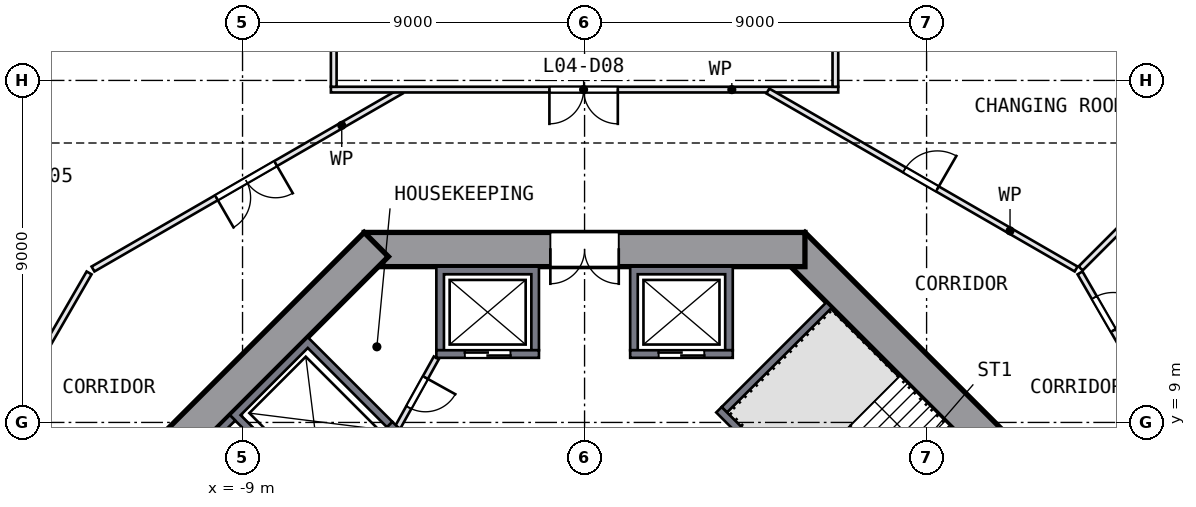
"""IFC4 building model, lengths in metres.
Left out: names, types, materials, properties, quantities, classifications, styles, units other than length and angle.
Written with IfcOpenShell. Run it as: python <this file> out.ifc"""

import sys

from ifc_helpers import new_model, si_unit, direction, frame, frame_2d, origin, place, context, subcontext, project, spatial, polyline, rectangle, outline, extrude, element, fill, save


model = new_model("IFC4")
c1 = context("Model", 3, precision=1e-05, world=origin(), true_north=direction((0.0, 1.0)))
c2 = subcontext(c1, "Body", "Model", "MODEL_VIEW")
j1 = project(units=[si_unit("LENGTHUNIT", "METRE"), si_unit("PLANEANGLEUNIT", "RADIAN")], contexts=[c1])
p1 = place(None, origin())
s1 = spatial("IfcSite", under=j1, at=p1, CompositionType="ELEMENT")
p2 = place(p1, origin())
s2 = spatial("IfcBuilding", under=s1, at=p2, CompositionType="ELEMENT")
p3 = place(p2, frame((0.0, 0.0, 23.5)))
s3 = spatial("IfcBuildingStorey", under=s2, at=p3, CompositionType="ELEMENT", Elevation=23.5)
p4 = place(p3, frame((13.682, 5.481, 0.0), z_axis=(0.0, 0.0, 1.0), x_axis=(-0.707106781, 0.707106781, 0.0)))
e1 = element("IfcWall", 1, at=p4, inside=s3, PredefinedType="SHEAR", context=c2, shape_type="SweptSolid", body=[
    extrude(rectangle(XDim=11.598, YDim=0.9, at=frame_2d((5.799, 0.0))), origin(), (0.0, 0.0, 1.0), 4.5),
])
p5 = place(p4, frame((2.099, 0.0, 0.0)))
e2 = element("IfcOpeningElement", 2, at=p5, cuts=e1, PredefinedType="OPENING", context=c2, shape_type="SweptSolid", body=[
    extrude(rectangle(XDim=1.2, YDim=2.1, at=frame_2d((0.6, 1.05))), frame((0.0, 0.46, 0.0), z_axis=(0.0, -1.0, 0.0), x_axis=(1.0, 0.0, 0.0)), (0.0, 0.0, 1.0), 0.92),
])
p6 = place(p3, frame((5.799, 13.55, 0.0), z_axis=(0.0, 0.0, 1.0), x_axis=(-1.0, 0.0, 0.0)))
e3 = element("IfcWall", 3, at=p6, inside=s3, PredefinedType="SHEAR", context=c2, shape_type="SweptSolid", body=[
    extrude(rectangle(XDim=11.598, YDim=0.9, at=frame_2d((5.799, 0.0))), origin(), (0.0, 0.0, 1.0), 4.5),
])
p7 = place(p6, frame((4.899, 0.0, 0.0)))
e4 = element("IfcOpeningElement", 4, at=p7, cuts=e3, PredefinedType="OPENING", context=c2, shape_type="SweptSolid", body=[
    extrude(rectangle(XDim=1.8, YDim=2.1, at=frame_2d((0.9, 1.05))), frame((0.0, 0.46, 0.0), z_axis=(0.0, -1.0, 0.0), x_axis=(1.0, 0.0, 0.0)), (0.0, 0.0, 1.0), 0.92),
])
p8 = place(p3, frame((-5.481, 13.682, 0.0), z_axis=(0.0, 0.0, 1.0), x_axis=(-0.707106781, -0.707106781, 0.0)))
e5 = element("IfcWall", 5, at=p8, inside=s3, PredefinedType="SHEAR", context=c2, shape_type="SweptSolid", body=[
    extrude(rectangle(XDim=11.598, YDim=0.9, at=frame_2d((5.799, 0.0))), origin(), (0.0, 0.0, 1.0), 4.5),
])
p9 = place(p3, frame((-6.36, 24.258, 0.0), z_axis=(0.0, 0.0, 1.0), x_axis=(-0.866029009, -0.499993756, 0.0)))
e6 = element("IfcWall", 6, at=p9, inside=s3, PredefinedType="SOLIDWALL", context=c2, shape_type="SweptSolid", body=[
    extrude(rectangle(XDim=13.242, YDim=0.14, at=frame_2d((6.621, 0.0))), origin(), (0.0, 0.0, 1.0), 4.0),
])
p10 = place(p9, frame((1.46, 0.0, 0.9)))
e7 = element("IfcOpeningElement", 7, at=p10, cuts=e6, PredefinedType="OPENING", context=c2, shape_type="SweptSolid", body=[
    extrude(rectangle(XDim=3.6, YDim=2.4, at=frame_2d((1.8, 1.2))), frame((0.0, 0.08, 0.0), z_axis=(0.0, -1.0, 0.0), x_axis=(1.0, 0.0, 0.0)), (0.0, 0.0, 1.0), 0.16),
])
p11 = place(p9, frame((8.215, 0.0, 0.9)))
e8 = element("IfcOpeningElement", 8, at=p11, cuts=e6, PredefinedType="OPENING", context=c2, shape_type="SweptSolid", body=[
    extrude(rectangle(XDim=3.0, YDim=2.4, at=frame_2d((1.5, 1.2))), frame((0.0, 0.08, 0.0), z_axis=(0.0, -1.0, 0.0), x_axis=(1.0, 0.0, 0.0)), (0.0, 0.0, 1.0), 0.16),
])
p12 = place(p3, frame((17.586, 17.777, 0.0), z_axis=(0.0, 0.0, 1.0), x_axis=(-0.866023287, 0.500003667, 0.0)))
e9 = element("IfcWall", 9, at=p12, inside=s3, PredefinedType="SOLIDWALL", context=c2, shape_type="SweptSolid", body=[
    extrude(rectangle(XDim=12.801, YDim=0.14, at=frame_2d((6.4, 0.0))), origin(), (0.0, 0.0, 1.0), 4.0),
])
p13 = place(p12, frame((1.748, 0.0, 0.9)))
e10 = element("IfcOpeningElement", 10, at=p13, cuts=e9, PredefinedType="OPENING", context=c2, shape_type="SweptSolid", body=[
    extrude(rectangle(XDim=3.0, YDim=2.4, at=frame_2d((1.5, 1.2))), frame((0.0, 0.08, 0.0), z_axis=(0.0, -1.0, 0.0), x_axis=(1.0, 0.0, 0.0)), (0.0, 0.0, 1.0), 0.16),
])
p14 = place(p12, frame((7.902, 0.0, 0.9)))
e11 = element("IfcOpeningElement", 11, at=p14, cuts=e9, PredefinedType="OPENING", context=c2, shape_type="SweptSolid", body=[
    extrude(rectangle(XDim=3.6, YDim=2.4, at=frame_2d((1.8, 1.2))), frame((0.0, 0.08, 0.0), z_axis=(0.0, -1.0, 0.0), x_axis=(1.0, 0.0, 0.0)), (0.0, 0.0, 1.0), 0.16),
])
p15 = place(p3, origin())
e12 = element("IfcWall", 12, at=p15, inside=s3, PredefinedType="SOLIDWALL", context=c2, shape_type="SweptSolid", body=[
    extrude(outline(polyline([(3.9, 13.1), (3.9, 10.9), (3.7, 10.9), (3.7, 12.9), (1.4, 12.9), (1.4, 10.9), (1.2, 10.9), (1.2, 13.1), (3.9, 13.1)])), origin(), (0.0, 0.0, 1.0), 4.0),
])
p16 = place(p3, frame((1.2, 10.8, 0.0), z_axis=(0.0, 0.0, 1.0), x_axis=(1.0, 0.0, 0.0)))
e13 = element("IfcWall", 13, at=p16, inside=s3, PredefinedType="SOLIDWALL", context=c2, shape_type="SweptSolid", body=[
    extrude(rectangle(XDim=2.7, YDim=0.2, at=frame_2d((1.35, 0.0))), origin(), (0.0, 0.0, 1.0), 4.0),
])
p17 = place(p16, frame((0.75, 0.0, 0.0)))
e14 = element("IfcOpeningElement", 14, at=p17, cuts=e13, PredefinedType="OPENING", context=c2, shape_type="SweptSolid", body=[
    extrude(rectangle(XDim=1.2, YDim=2.1, at=frame_2d((0.6, 1.05))), frame((0.0, 0.11, 0.0), z_axis=(0.0, -1.0, 0.0), x_axis=(1.0, 0.0, 0.0)), (0.0, 0.0, 1.0), 0.22),
])
p18 = place(p3, origin())
e15 = element("IfcWall", 15, at=p18, inside=s3, PredefinedType="SOLIDWALL", context=c2, shape_type="SweptSolid", body=[
    extrude(outline(polyline([(-3.9, 10.9), (-3.9, 13.1), (-1.2, 13.1), (-1.2, 10.9), (-1.4, 10.9), (-1.4, 12.9), (-3.7, 12.9), (-3.7, 10.9), (-3.9, 10.9)])), origin(), (0.0, 0.0, 1.0), 4.0),
])
p19 = place(p3, frame((-1.2, 10.8, 0.0), z_axis=(0.0, 0.0, 1.0), x_axis=(-1.0, 0.0, 0.0)))
e16 = element("IfcWall", 16, at=p19, inside=s3, PredefinedType="SOLIDWALL", context=c2, shape_type="SweptSolid", body=[
    extrude(rectangle(XDim=2.7, YDim=0.2, at=frame_2d((1.35, 0.0))), origin(), (0.0, 0.0, 1.0), 4.0),
])
p20 = place(p19, frame((0.75, 0.0, 0.0)))
e17 = element("IfcOpeningElement", 17, at=p20, cuts=e16, PredefinedType="OPENING", context=c2, shape_type="SweptSolid", body=[
    extrude(rectangle(XDim=1.2, YDim=2.1, at=frame_2d((0.6, 1.05))), frame((0.0, 0.11, 0.0), z_axis=(0.0, -1.0, 0.0), x_axis=(1.0, 0.0, 0.0)), (0.0, 0.0, 1.0), 0.22),
])
p21 = place(p3, origin())
e18 = element("IfcWall", 18, at=p21, inside=s3, PredefinedType="SOLIDWALL", context=c2, shape_type="SweptSolid", body=[
    extrude(outline(polyline([(-9.334, 9.192), (-7.283, 11.243), (-5.056, 9.016), (-5.197, 8.874), (-7.283, 10.96), (-9.051, 9.192), (-6.965, 7.106), (-7.106, 6.965), (-9.334, 9.192)])), origin(), (0.0, 0.0, 1.0), 4.0),
])
p22 = place(p3, frame((-4.985, 8.945, 0.0), z_axis=(0.0, 0.0, 1.0), x_axis=(-0.707106781, -0.707106781, 0.0)))
e19 = element("IfcWall", 19, at=p22, inside=s3, PredefinedType="SOLIDWALL", context=c2, shape_type="SweptSolid", body=[
    extrude(rectangle(XDim=2.9, YDim=0.2, at=frame_2d((1.45, 0.0))), origin(), (0.0, 0.0, 1.0), 4.0),
])
p23 = place(p22, frame((0.85, 0.0, 0.0)))
e20 = element("IfcOpeningElement", 20, at=p23, cuts=e19, PredefinedType="OPENING", context=c2, shape_type="SweptSolid", body=[
    extrude(rectangle(XDim=1.2, YDim=2.1, at=frame_2d((0.6, 1.05))), frame((0.0, 0.11, 0.0), z_axis=(0.0, -1.0, 0.0), x_axis=(1.0, 0.0, 0.0)), (0.0, 0.0, 1.0), 0.22),
])
p24 = place(p3, origin())
e21 = element("IfcWall", 21, at=p24, inside=s3, PredefinedType="SOLIDWALL", context=c2, shape_type="SweptSolid", body=[
    extrude(outline(polyline([(-11.243, 7.283), (-9.334, 9.192), (-9.192, 9.051), (-10.96, 7.283), (-8.874, 5.197), (-9.016, 5.056), (-11.243, 7.283)])), origin(), (0.0, 0.0, 1.0), 4.0),
])
p25 = place(p3, frame((3.535, 9.334, 0.0), z_axis=(0.0, 0.0, 1.0), x_axis=(0.707106781, -0.707106781, 0.0)))
e22 = element("IfcWall", 22, at=p25, inside=s3, PredefinedType="SOLIDWALL", context=c2, shape_type="SweptSolid", body=[
    extrude(rectangle(XDim=8.2, YDim=0.2, at=frame_2d((4.1, 0.0))), origin(), (0.0, 0.0, 1.0), 4.0),
])
p26 = place(p25, frame((6.6, 0.0, 0.0)))
e23 = element("IfcOpeningElement", 23, at=p26, cuts=e22, PredefinedType="OPENING", context=c2, shape_type="SweptSolid", body=[
    extrude(rectangle(XDim=1.2, YDim=2.1, at=frame_2d((0.6, 1.05))), frame((0.0, 0.11, 0.0), z_axis=(0.0, -1.0, 0.0), x_axis=(1.0, 0.0, 0.0)), (0.0, 0.0, 1.0), 0.22),
])
p27 = place(p3, frame((3.677, 9.334, 0.0), z_axis=(0.0, 0.0, 1.0), x_axis=(0.707106781, 0.707106781, 0.0)))
e24 = element("IfcWall", 24, at=p27, inside=s3, PredefinedType="SOLIDWALL", context=c2, shape_type="SweptSolid", body=[
    extrude(rectangle(XDim=3.9, YDim=0.2, at=frame_2d((1.95, 0.0))), origin(), (0.0, 0.0, 1.0), 4.0),
])
p28 = place(p3, frame((-3.9, 10.7, 0.0), z_axis=(0.0, 0.0, 1.0), x_axis=(-0.485692555, -0.874129705, 0.0)))
e25 = element("IfcWall", 25, at=p28, inside=s3, PredefinedType="PARTITIONING", context=c2, shape_type="SweptSolid", body=[
    extrude(rectangle(XDim=2.089, YDim=0.15, at=frame_2d((1.044, 0.0))), origin(), (0.0, 0.0, 1.0), 4.0),
])
p29 = place(p28, frame((0.594, 0.0, 0.0)))
e26 = element("IfcOpeningElement", 26, at=p29, cuts=e25, PredefinedType="OPENING", context=c2, shape_type="SweptSolid", body=[
    extrude(rectangle(XDim=0.9, YDim=2.1, at=frame_2d((0.45, 1.05))), frame((0.0, 0.085, 0.0), z_axis=(0.0, -1.0, 0.0), x_axis=(1.0, 0.0, 0.0)), (0.0, 0.0, 1.0), 0.17),
])
p30 = place(p3, frame((-17.721, 4.823, 0.0), z_axis=(0.0, 0.0, 1.0), x_axis=(0.499979668, 0.866037142, 0.0)))
e27 = element("IfcWall", 27, at=p30, inside=s3, PredefinedType="PARTITIONING", context=c2, shape_type="SweptSolid", body=[
    extrude(rectangle(XDim=9.367, YDim=0.15, at=frame_2d((4.683, 0.0))), origin(), (0.0, 0.0, 1.0), 4.0),
])
p31 = place(p3, frame((-4.823, 17.721, 0.0), z_axis=(0.0, 0.0, 1.0), x_axis=(-0.866037142, -0.499979668, 0.0)))
e28 = element("IfcWall", 28, at=p31, inside=s3, PredefinedType="PARTITIONING", context=c2, shape_type="SweptSolid", body=[
    extrude(rectangle(XDim=9.367, YDim=0.15, at=frame_2d((4.683, 0.0))), origin(), (0.0, 0.0, 1.0), 4.0),
])
p32 = place(p31, frame((3.817, 0.0, 0.0)))
e29 = element("IfcOpeningElement", 29, at=p32, cuts=e28, PredefinedType="OPENING", context=c2, shape_type="SweptSolid", body=[
    extrude(rectangle(XDim=1.8, YDim=2.1, at=frame_2d((0.9, 1.05))), frame((0.0, 0.085, 0.0), z_axis=(0.0, -1.0, 0.0), x_axis=(1.0, 0.0, 0.0)), (0.0, 0.0, 1.0), 0.17),
])
p33 = place(p3, frame((6.675, 17.758, 0.0), z_axis=(0.0, 0.0, 1.0), x_axis=(-1.0, 0.0, 0.0)))
e30 = element("IfcWall", 30, at=p33, inside=s3, PredefinedType="PARTITIONING", context=c2, shape_type="SweptSolid", body=[
    extrude(rectangle(XDim=13.35, YDim=0.15, at=frame_2d((6.675, 0.0))), origin(), (0.0, 0.0, 1.0), 4.0),
])
p34 = place(p33, frame((5.8, 0.0, 0.0)))
e31 = element("IfcOpeningElement", 31, at=p34, cuts=e30, PredefinedType="OPENING", context=c2, shape_type="SweptSolid", body=[
    extrude(rectangle(XDim=1.8, YDim=2.1, at=frame_2d((0.9, 1.05))), frame((0.0, 0.085, 0.0), z_axis=(0.0, -1.0, 0.0), x_axis=(1.0, 0.0, 0.0)), (0.0, 0.0, 1.0), 0.17),
])
p35 = place(p3, frame((-6.6, 23.415, 0.0), z_axis=(0.0, 0.0, 1.0), x_axis=(0.0, -1.0, 0.0)))
e32 = element("IfcWall", 32, at=p35, inside=s3, PredefinedType="PARTITIONING", context=c2, shape_type="SweptSolid", body=[
    extrude(rectangle(XDim=5.582, YDim=0.15, at=frame_2d((2.791, 0.0))), origin(), (0.0, 0.0, 1.0), 4.0),
])
p36 = place(p3, frame((4.823, 17.721, 0.0), z_axis=(0.0, 0.0, 1.0), x_axis=(0.866037142, -0.499979668, 0.0)))
e33 = element("IfcWall", 33, at=p36, inside=s3, PredefinedType="PARTITIONING", context=c2, shape_type="SweptSolid", body=[
    extrude(rectangle(XDim=9.367, YDim=0.15, at=frame_2d((4.683, 0.0))), origin(), (0.0, 0.0, 1.0), 4.0),
])
p37 = place(p36, frame((4.15, 0.0, 0.0)))
e34 = element("IfcOpeningElement", 34, at=p37, cuts=e33, PredefinedType="OPENING", context=c2, shape_type="SweptSolid", body=[
    extrude(rectangle(XDim=1.0, YDim=2.1, at=frame_2d((0.5, 1.05))), frame((0.0, 0.085, 0.0), z_axis=(0.0, -1.0, 0.0), x_axis=(1.0, 0.0, 0.0)), (0.0, 0.0, 1.0), 0.17),
])
p38 = place(p3, frame((6.6, 17.833, 0.0), z_axis=(0.0, 0.0, 1.0), x_axis=(0.0, 1.0, 0.0)))
e35 = element("IfcWall", 35, at=p38, inside=s3, PredefinedType="PARTITIONING", context=c2, shape_type="SweptSolid", body=[
    extrude(rectangle(XDim=5.582, YDim=0.15, at=frame_2d((2.791, 0.0))), origin(), (0.0, 0.0, 1.0), 4.0),
])
p39 = place(p3, frame((13.038, 12.935, 0.0), z_axis=(0.0, 0.0, 1.0), x_axis=(0.499933044, -0.866064057, 0.0)))
e36 = element("IfcWall", 36, at=p39, inside=s3, PredefinedType="PARTITIONING", context=c2, shape_type="SweptSolid", body=[
    extrude(rectangle(XDim=2.408, YDim=0.15, at=frame_2d((1.204, 0.0))), origin(), (0.0, 0.0, 1.0), 4.0),
])
p40 = place(p39, frame((0.75, 0.0, 0.0)))
e37 = element("IfcOpeningElement", 37, at=p40, cuts=e36, PredefinedType="OPENING", context=c2, shape_type="SweptSolid", body=[
    extrude(rectangle(XDim=1.0, YDim=2.1, at=frame_2d((0.5, 1.05))), frame((0.0, 0.085, 0.0), z_axis=(0.0, -1.0, 0.0), x_axis=(1.0, 0.0, 0.0)), (0.0, 0.0, 1.0), 0.17),
])
p41 = place(p3, frame((17.7, 17.7, 0.0), z_axis=(0.0, 0.0, 1.0), x_axis=(-0.707106781, -0.707106781, 0.0)))
e38 = element("IfcWall", 38, at=p41, inside=s3, PredefinedType="PARTITIONING", context=c2, shape_type="SweptSolid", body=[
    extrude(rectangle(XDim=6.572, YDim=0.15, at=frame_2d((3.286, 0.0))), origin(), (0.0, 0.0, 1.0), 4.0),
])
p42 = place(p11, origin())
e39 = element("IfcWindow", 39, at=p42, inside=s3, PartitioningType="SINGLE_PANEL", PredefinedType="WINDOW", context=c2, shape_type="SweptSolid", body=[
    extrude(rectangle(XDim=3.0, YDim=2.4, at=frame_2d((1.5, 1.2))), frame((0.0, 0.03, 0.0), z_axis=(0.0, -1.0, 0.0), x_axis=(1.0, 0.0, 0.0)), (0.0, 0.0, 1.0), 0.06),
])
fill(e8, e39)
p43 = place(p13, origin())
e40 = element("IfcWindow", 40, at=p43, inside=s3, PartitioningType="SINGLE_PANEL", PredefinedType="WINDOW", context=c2, shape_type="SweptSolid", body=[
    extrude(rectangle(XDim=3.0, YDim=2.4, at=frame_2d((1.5, 1.2))), frame((0.0, 0.03, 0.0), z_axis=(0.0, -1.0, 0.0), x_axis=(1.0, 0.0, 0.0)), (0.0, 0.0, 1.0), 0.06),
])
fill(e10, e40)
p44 = place(p17, origin())
e41 = element("IfcDoor", 41, at=p44, inside=s3, OperationType="DOUBLE_DOOR_SLIDING", PredefinedType="DOOR", context=c2, shape_type="SweptSolid", body=[
    extrude(rectangle(XDim=1.2, YDim=2.1, at=frame_2d((0.6, 1.05))), frame((0.0, 0.025, 0.0), z_axis=(0.0, -1.0, 0.0), x_axis=(1.0, 0.0, 0.0)), (0.0, 0.0, 1.0), 0.05),
])
fill(e14, e41)
p45 = place(p20, origin())
e42 = element("IfcDoor", 42, at=p45, inside=s3, OperationType="DOUBLE_DOOR_SLIDING", PredefinedType="DOOR", context=c2, shape_type="SweptSolid", body=[
    extrude(rectangle(XDim=1.2, YDim=2.1, at=frame_2d((0.6, 1.05))), frame((0.0, 0.025, 0.0), z_axis=(0.0, -1.0, 0.0), x_axis=(1.0, 0.0, 0.0)), (0.0, 0.0, 1.0), 0.05),
])
fill(e17, e42)
p46 = place(p7, origin())
e43 = element("IfcDoor", 43, at=p46, inside=s3, OperationType="DOUBLE_DOOR_SINGLE_SWING", PredefinedType="DOOR", context=c2, shape_type="SweptSolid", body=[
    extrude(rectangle(XDim=1.8, YDim=2.1, at=frame_2d((0.9, 1.05))), frame((0.0, 0.025, 0.0), z_axis=(0.0, -1.0, 0.0), x_axis=(1.0, 0.0, 0.0)), (0.0, 0.0, 1.0), 0.05),
])
fill(e4, e43)
p47 = place(p29, origin())
e44 = element("IfcDoor", 44, at=p47, inside=s3, OperationType="SINGLE_SWING_LEFT", PredefinedType="DOOR", context=c2, shape_type="SweptSolid", body=[
    extrude(rectangle(XDim=0.9, YDim=2.1, at=frame_2d((0.45, 1.05))), frame((0.0, 0.025, 0.0), z_axis=(0.0, -1.0, 0.0), x_axis=(1.0, 0.0, 0.0)), (0.0, 0.0, 1.0), 0.05),
])
fill(e26, e44)
p48 = place(p32, origin())
e45 = element("IfcDoor", 45, at=p48, inside=s3, OperationType="DOUBLE_DOOR_SINGLE_SWING", PredefinedType="DOOR", context=c2, shape_type="SweptSolid", body=[
    extrude(rectangle(XDim=1.8, YDim=2.1, at=frame_2d((0.9, 1.05))), frame((0.0, 0.025, 0.0), z_axis=(0.0, -1.0, 0.0), x_axis=(1.0, 0.0, 0.0)), (0.0, 0.0, 1.0), 0.05),
])
fill(e29, e45)
p49 = place(p34, origin())
e46 = element("IfcDoor", 46, at=p49, inside=s3, OperationType="DOUBLE_DOOR_SINGLE_SWING", PredefinedType="DOOR", context=c2, shape_type="SweptSolid", body=[
    extrude(rectangle(XDim=1.8, YDim=2.1, at=frame_2d((0.9, 1.05))), frame((0.0, 0.025, 0.0), z_axis=(0.0, -1.0, 0.0), x_axis=(1.0, 0.0, 0.0)), (0.0, 0.0, 1.0), 0.05),
])
fill(e31, e46)
p50 = place(p37, origin())
e47 = element("IfcDoor", 47, at=p50, inside=s3, OperationType="SINGLE_SWING_RIGHT", PredefinedType="DOOR", context=c2, shape_type="SweptSolid", body=[
    extrude(rectangle(XDim=1.0, YDim=2.1, at=frame_2d((0.5, 1.05))), frame((0.0, 0.025, 0.0), z_axis=(0.0, -1.0, 0.0), x_axis=(1.0, 0.0, 0.0)), (0.0, 0.0, 1.0), 0.05),
])
fill(e34, e47)
p51 = place(p40, origin())
e48 = element("IfcDoor", 48, at=p51, inside=s3, OperationType="SINGLE_SWING_RIGHT", PredefinedType="DOOR", context=c2, shape_type="SweptSolid", body=[
    extrude(rectangle(XDim=1.0, YDim=2.1, at=frame_2d((0.5, 1.05))), frame((0.0, 0.025, 0.0), z_axis=(0.0, -1.0, 0.0), x_axis=(1.0, 0.0, 0.0)), (0.0, 0.0, 1.0), 0.05),
])
fill(e37, e48)
save(model, sys.argv[1])
